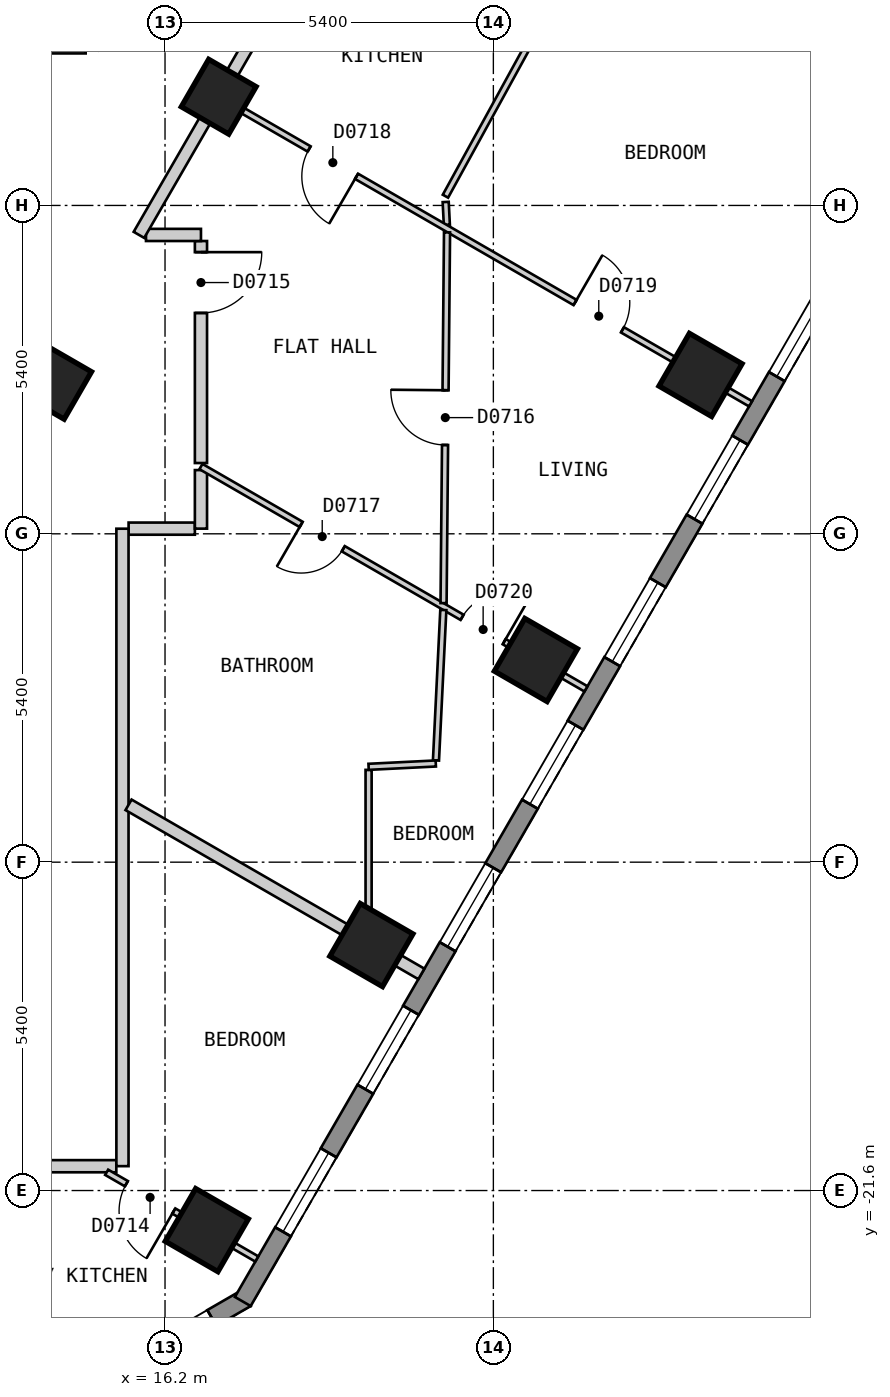
"""IFC4 building model, lengths in metres.
Left out: names, types, materials, properties, quantities, classifications, styles, units other than length and angle.
Written with IfcOpenShell. Run it as: python <this file> out.ifc"""

import sys

from ifc_helpers import new_model, si_unit, direction, frame, frame_2d, origin, origin_2d, place, context, subcontext, project, spatial, polyline, rectangle, outline, extrude, element, fill, save


model = new_model("IFC4")
c1 = context("Model", 3, precision=1e-05, world=origin(), true_north=direction((0.0, 1.0)))
c2 = subcontext(c1, "Body", "Model", "MODEL_VIEW")
j1 = project(units=[si_unit("LENGTHUNIT", "METRE"), si_unit("PLANEANGLEUNIT", "RADIAN")], contexts=[c1])
p1 = place(None, origin())
s1 = spatial("IfcSite", under=j1, at=p1, CompositionType="ELEMENT")
p2 = place(p1, origin())
s2 = spatial("IfcBuilding", under=s1, at=p2, CompositionType="ELEMENT")
p3 = place(p2, frame((0.0, 0.0, 105.0)))
s3 = spatial("IfcBuildingStorey", under=s2, at=p3, CompositionType="ELEMENT", Elevation=105.0)
for number, where, z_axis, x_axis in (
    (1, (16.887, -22.251, 0.0), (0.0, 0.0, 1.0), (0.5, 0.866, 0.0)),
    (2, (19.594, -17.563, 0.0), (0.0, 0.0, 1.0), (0.5, 0.866, 0.0)),
    (3, (22.3, -12.875, 0.0), (0.0, 0.0, 1.0), (0.5, 0.866, 0.0)),
    (4, (25.007, -8.187, 0.0), (0.0, 0.0, 1.0), (0.5, 0.866, 0.0)),
):
    element("IfcColumn", number, at=place(p3, frame(where, z_axis=z_axis, x_axis=x_axis)), inside=s3, PredefinedType="COLUMN", context=c2, shape_type="SweptSolid", body=[
        extrude(rectangle(XDim=1.0, YDim=1.0, at=origin_2d()), origin(), (0.0, 0.0, 1.0), 3.0),
    ])
for number, where, z_axis, x_axis in (
    (5, (14.376, -8.3, 0.0), (0.0, 0.0, 1.0), (0.5, 0.866, 0.0)),
    (6, (17.083, -3.612, 0.0), (0.0, 0.0, 1.0), (0.5, 0.866, 0.0)),
):
    element("IfcColumn", number, at=place(p3, frame(where, z_axis=z_axis, x_axis=x_axis)), inside=s3, PredefinedType="COLUMN", context=c2, shape_type="SweptSolid", body=[
        extrude(rectangle(XDim=0.9, YDim=0.9, at=origin_2d()), origin(), (0.0, 0.0, 1.0), 3.0),
    ])
p4 = place(p3, frame((13.204, -25.87, 0.0), z_axis=(0.0, 0.0, 1.0), x_axis=(0.866010750942, 0.50002537861, 0.0)))
e7 = element("IfcWall", 7, at=p4, inside=s3, PredefinedType="SOLIDWALL", context=c2, shape_type="SweptSolid", body=[
    extrude(outline(polyline([(0.0, -0.15), (5.0, -0.15), (4.919, 0.15), (0.08, 0.15), (0.0, -0.15)])), origin(), (0.0, 0.0, 1.0), 2.6),
])
p5 = place(p4, frame((0.65, 0.0, 0.15)))
e8 = element("IfcOpeningElement", 8, at=p5, cuts=e7, PredefinedType="OPENING", context=c2, shape_type="SweptSolid", body=[
    extrude(rectangle(XDim=1.2, YDim=2.1, at=frame_2d((0.6, 1.05))), frame((0.0, 0.16, 0.0), z_axis=(0.0, -1.0, 0.0), x_axis=(1.0, 0.0, 0.0)), (0.0, 0.0, 1.0), 0.32),
])
p6 = place(p4, frame((3.149, 0.0, 0.15)))
e9 = element("IfcOpeningElement", 9, at=p6, cuts=e7, PredefinedType="OPENING", context=c2, shape_type="SweptSolid", body=[
    extrude(rectangle(XDim=1.2, YDim=2.1, at=frame_2d((0.6, 1.05))), frame((0.0, 0.16, 0.0), z_axis=(0.0, -1.0, 0.0), x_axis=(1.0, 0.0, 0.0)), (0.0, 0.0, 1.0), 0.32),
])
p7 = place(p3, frame((17.479, -23.425, 0.0), z_axis=(0.0, 0.0, 1.0), x_axis=(0.500035407905, 0.866004960056, 0.0)))
e10 = element("IfcWall", 10, at=p7, inside=s3, PredefinedType="SOLIDWALL", context=c2, shape_type="SweptSolid", body=[
    extrude(outline(polyline([(0.0, -0.15), (23.094, -0.15), (23.014, 0.15), (0.08, 0.15), (0.0, -0.15)])), origin(), (0.0, 0.0, 1.0), 2.6),
])
p8 = place(p7, frame((1.324, 0.0, 0.15)))
e11 = element("IfcOpeningElement", 11, at=p8, cuts=e10, PredefinedType="OPENING", context=c2, shape_type="SweptSolid", body=[
    extrude(rectangle(XDim=1.5, YDim=2.1, at=frame_2d((0.75, 1.05))), frame((0.0, 0.16, 0.0), z_axis=(0.0, -1.0, 0.0), x_axis=(1.0, 0.0, 0.0)), (0.0, 0.0, 1.0), 0.32),
])
p9 = place(p7, frame((4.031, 0.0, 0.15)))
e12 = element("IfcOpeningElement", 12, at=p9, cuts=e10, PredefinedType="OPENING", context=c2, shape_type="SweptSolid", body=[
    extrude(rectangle(XDim=1.5, YDim=2.1, at=frame_2d((0.75, 1.05))), frame((0.0, 0.16, 0.0), z_axis=(0.0, -1.0, 0.0), x_axis=(1.0, 0.0, 0.0)), (0.0, 0.0, 1.0), 0.32),
])
p10 = place(p7, frame((6.737, 0.0, 0.15)))
e13 = element("IfcOpeningElement", 13, at=p10, cuts=e10, PredefinedType="OPENING", context=c2, shape_type="SweptSolid", body=[
    extrude(rectangle(XDim=1.5, YDim=2.1, at=frame_2d((0.75, 1.05))), frame((0.0, 0.16, 0.0), z_axis=(0.0, -1.0, 0.0), x_axis=(1.0, 0.0, 0.0)), (0.0, 0.0, 1.0), 0.32),
])
p11 = place(p7, frame((9.444, 0.0, 0.15)))
e14 = element("IfcOpeningElement", 14, at=p11, cuts=e10, PredefinedType="OPENING", context=c2, shape_type="SweptSolid", body=[
    extrude(rectangle(XDim=1.5, YDim=2.1, at=frame_2d((0.75, 1.05))), frame((0.0, 0.16, 0.0), z_axis=(0.0, -1.0, 0.0), x_axis=(1.0, 0.0, 0.0)), (0.0, 0.0, 1.0), 0.32),
])
p12 = place(p7, frame((12.151, 0.0, 0.15)))
e15 = element("IfcOpeningElement", 15, at=p12, cuts=e10, PredefinedType="OPENING", context=c2, shape_type="SweptSolid", body=[
    extrude(rectangle(XDim=1.5, YDim=2.1, at=frame_2d((0.75, 1.05))), frame((0.0, 0.16, 0.0), z_axis=(0.0, -1.0, 0.0), x_axis=(1.0, 0.0, 0.0)), (0.0, 0.0, 1.0), 0.32),
])
p13 = place(p7, frame((14.857, 0.0, 0.15)))
e16 = element("IfcOpeningElement", 16, at=p13, cuts=e10, PredefinedType="OPENING", context=c2, shape_type="SweptSolid", body=[
    extrude(rectangle(XDim=1.5, YDim=2.1, at=frame_2d((0.75, 1.05))), frame((0.0, 0.16, 0.0), z_axis=(0.0, -1.0, 0.0), x_axis=(1.0, 0.0, 0.0)), (0.0, 0.0, 1.0), 0.32),
])
p14 = place(p7, frame((17.564, 0.0, 0.15)))
e17 = element("IfcOpeningElement", 17, at=p14, cuts=e10, PredefinedType="OPENING", context=c2, shape_type="SweptSolid", body=[
    extrude(rectangle(XDim=1.5, YDim=2.1, at=frame_2d((0.75, 1.05))), frame((0.0, 0.16, 0.0), z_axis=(0.0, -1.0, 0.0), x_axis=(1.0, 0.0, 0.0)), (0.0, 0.0, 1.0), 0.32),
])
p15 = place(p7, frame((20.271, 0.0, 0.15)))
e18 = element("IfcOpeningElement", 18, at=p15, cuts=e10, PredefinedType="OPENING", context=c2, shape_type="SweptSolid", body=[
    extrude(rectangle(XDim=1.5, YDim=2.1, at=frame_2d((0.75, 1.05))), frame((0.0, 0.16, 0.0), z_axis=(0.0, -1.0, 0.0), x_axis=(1.0, 0.0, 0.0)), (0.0, 0.0, 1.0), 0.32),
])
p16 = place(p3, frame((16.791, -5.985, 0.0), z_axis=(0.0, 0.0, 1.0), x_axis=(0.0, -1.0, 0.0)))
e19 = element("IfcWall", 19, at=p16, inside=s3, PredefinedType="PARTITIONING", context=c2, shape_type="SweptSolid", body=[
    extrude(rectangle(XDim=3.651, YDim=0.2, at=frame_2d((1.825, 0.0))), origin(), (0.0, 0.0, 1.0), 2.6),
])
p17 = place(p16, frame((0.183, 0.0, 0.0)))
e20 = element("IfcOpeningElement", 20, at=p17, cuts=e19, PredefinedType="OPENING", context=c2, shape_type="SweptSolid", body=[
    extrude(rectangle(XDim=1.0, YDim=2.1, at=frame_2d((0.5, 1.05))), frame((0.0, 0.11, 0.0), z_axis=(0.0, -1.0, 0.0), x_axis=(1.0, 0.0, 0.0)), (0.0, 0.0, 1.0), 0.22),
])
p18 = place(p3, frame((15.887, -5.885, 0.0), z_axis=(0.0, 0.0, 1.0), x_axis=(1.0, 0.0, 0.0)))
e21 = element("IfcWall", 21, at=p18, inside=s3, PredefinedType="PARTITIONING", context=c2, shape_type="SweptSolid", body=[
    extrude(rectangle(XDim=0.904, YDim=0.2, at=frame_2d((0.452, 0.0))), origin(), (0.0, 0.0, 1.0), 2.6),
])
p19 = place(p3, frame((15.601, -10.715, 0.0), z_axis=(0.0, 0.0, 1.0), x_axis=(1.0, 0.0, 0.0)))
e22 = element("IfcWall", 22, at=p19, inside=s3, PredefinedType="PARTITIONING", context=c2, shape_type="SweptSolid", body=[
    extrude(rectangle(XDim=1.09, YDim=0.2, at=frame_2d((0.545, 0.0))), origin(), (0.0, 0.0, 1.0), 2.6),
])
p20 = place(p3, frame((-15.499, -21.2, 0.0), z_axis=(0.0, 0.0, 1.0), x_axis=(1.0, 0.0, 0.0)))
e23 = element("IfcWall", 23, at=p20, inside=s3, PredefinedType="PARTITIONING", context=c2, shape_type="SweptSolid", body=[
    extrude(rectangle(XDim=30.898, YDim=0.2, at=frame_2d((15.449, 0.0))), origin(), (0.0, 0.0, 1.0), 2.6),
])
p21 = place(p20, frame((9.977, 0.0, 0.0)))
e24 = element("IfcOpeningElement", 24, at=p21, cuts=e23, PredefinedType="OPENING", context=c2, shape_type="SweptSolid", body=[
    extrude(rectangle(XDim=1.0, YDim=2.1, at=frame_2d((0.5, 1.05))), frame((0.0, 0.11, 0.0), z_axis=(0.0, -1.0, 0.0), x_axis=(1.0, 0.0, 0.0)), (0.0, 0.0, 1.0), 0.22),
])
p22 = place(p20, frame((25.046, 0.0, 0.0)))
e25 = element("IfcOpeningElement", 25, at=p22, cuts=e23, PredefinedType="OPENING", context=c2, shape_type="SweptSolid", body=[
    extrude(rectangle(XDim=1.0, YDim=2.1, at=frame_2d((0.5, 1.05))), frame((0.0, 0.11, 0.0), z_axis=(0.0, -1.0, 0.0), x_axis=(1.0, 0.0, 0.0)), (0.0, 0.0, 1.0), 0.22),
])
p23 = place(p3, frame((6.929, -2.8, 0.0), z_axis=(0.0, 0.0, 1.0), x_axis=(1.0, 0.0, 0.0)))
e26 = element("IfcWall", 26, at=p23, inside=s3, PredefinedType="PARTITIONING", context=c2, shape_type="SweptSolid", body=[
    extrude(rectangle(XDim=7.966, YDim=0.2, at=frame_2d((3.983, 0.0))), origin(), (0.0, 0.0, 1.0), 2.6),
])
p24 = place(p3, frame((15.771, -5.884, 0.0), z_axis=(0.0, 0.0, 1.0), x_axis=(0.499917542299, 0.866073005526, 0.0)))
e27 = element("IfcWall", 27, at=p24, inside=s3, PredefinedType="PARTITIONING", context=c2, shape_type="SweptSolid", body=[
    extrude(rectangle(XDim=5.525, YDim=0.2, at=frame_2d((2.762, 0.0))), origin(), (0.0, 0.0, 1.0), 2.6),
])
p25 = place(p3, frame((15.5, -21.199, 0.0), z_axis=(0.0, 0.0, 1.0), x_axis=(0.0, 1.0, 0.0)))
e28 = element("IfcWall", 28, at=p25, inside=s3, PredefinedType="PARTITIONING", context=c2, shape_type="SweptSolid", body=[
    extrude(rectangle(XDim=10.483, YDim=0.2, at=frame_2d((5.241, 0.0))), origin(), (0.0, 0.0, 1.0), 2.6),
])
p26 = place(p3, frame((16.791, -10.715, 0.0), z_axis=(0.0, 0.0, 1.0), x_axis=(0.0, 1.0, 0.0)))
e29 = element("IfcWall", 29, at=p26, inside=s3, PredefinedType="PARTITIONING", context=c2, shape_type="SweptSolid", body=[
    extrude(rectangle(XDim=0.963, YDim=0.2, at=frame_2d((0.481, 0.0))), origin(), (0.0, 0.0, 1.0), 2.6),
])
p27 = place(p3, frame((20.816, -5.343, 0.0), z_axis=(0.0, 0.0, 1.0), x_axis=(0.05045379463, -0.99872639627, 0.0)))
e30 = element("IfcWall", 30, at=p27, inside=s3, PredefinedType="PARTITIONING", context=c2, shape_type="SweptSolid", body=[
    extrude(rectangle(XDim=0.377, YDim=0.1, at=frame_2d((0.189, 0.0))), origin(), (0.0, 0.0, 1.0), 2.6),
])
p28 = place(p3, frame((15.24, -21.3, 0.0), z_axis=(0.0, 0.0, 1.0), x_axis=(0.866090043625, -0.499888023795, 0.0)))
e31 = element("IfcWall", 31, at=p28, inside=s3, PredefinedType="PARTITIONING", context=c2, shape_type="SweptSolid", body=[
    extrude(rectangle(XDim=2.851, YDim=0.1, at=frame_2d((1.425, 0.0))), origin(), (0.0, 0.0, 1.0), 2.6),
])
p29 = place(p28, frame((0.375, 0.0, 0.0)))
e32 = element("IfcOpeningElement", 32, at=p29, cuts=e31, PredefinedType="OPENING", context=c2, shape_type="SweptSolid", body=[
    extrude(rectangle(XDim=0.9, YDim=2.1, at=frame_2d((0.45, 1.05))), frame((0.0, 0.06, 0.0), z_axis=(0.0, -1.0, 0.0), x_axis=(1.0, 0.0, 0.0)), (0.0, 0.0, 1.0), 0.12),
])
p30 = place(p3, frame((16.791, -9.694, 0.0), z_axis=(0.0, 0.0, 1.0), x_axis=(0.866013208994, -0.500021121402, 0.0)))
e33 = element("IfcWall", 33, at=p30, inside=s3, PredefinedType="PARTITIONING", context=c2, shape_type="SweptSolid", body=[
    extrude(rectangle(XDim=7.312, YDim=0.1, at=frame_2d((3.656, 0.0))), origin(), (0.0, 0.0, 1.0), 2.6),
])
p31 = place(p30, frame((1.903, 0.0, 0.0)))
e34 = element("IfcOpeningElement", 34, at=p31, cuts=e33, PredefinedType="OPENING", context=c2, shape_type="SweptSolid", body=[
    extrude(rectangle(XDim=0.8, YDim=2.1, at=frame_2d((0.4, 1.05))), frame((0.0, 0.06, 0.0), z_axis=(0.0, -1.0, 0.0), x_axis=(1.0, 0.0, 0.0)), (0.0, 0.0, 1.0), 0.12),
])
p32 = place(p30, frame((4.959, 0.0, 0.0)))
e35 = element("IfcOpeningElement", 35, at=p32, cuts=e33, PredefinedType="OPENING", context=c2, shape_type="SweptSolid", body=[
    extrude(rectangle(XDim=0.8, YDim=2.1, at=frame_2d((0.4, 1.05))), frame((0.0, 0.06, 0.0), z_axis=(0.0, -1.0, 0.0), x_axis=(1.0, 0.0, 0.0)), (0.0, 0.0, 1.0), 0.12),
])
p33 = place(p3, frame((17.169, -3.662, 0.0), z_axis=(0.0, 0.0, 1.0), x_axis=(0.866047370643, -0.499961950354, 0.0)))
e36 = element("IfcWall", 36, at=p33, inside=s3, PredefinedType="PARTITIONING", context=c2, shape_type="SweptSolid", body=[
    extrude(rectangle(XDim=10.001, YDim=0.1, at=frame_2d((5.0, 0.0))), origin(), (0.0, 0.0, 1.0), 2.6),
])
p34 = place(p33, frame((1.618, 0.0, 0.0)))
e37 = element("IfcOpeningElement", 37, at=p34, cuts=e36, PredefinedType="OPENING", context=c2, shape_type="SweptSolid", body=[
    extrude(rectangle(XDim=0.9, YDim=2.1, at=frame_2d((0.45, 1.05))), frame((0.0, 0.06, 0.0), z_axis=(0.0, -1.0, 0.0), x_axis=(1.0, 0.0, 0.0)), (0.0, 0.0, 1.0), 0.12),
])
p35 = place(p33, frame((6.668, 0.0, 0.0)))
e38 = element("IfcOpeningElement", 38, at=p35, cuts=e36, PredefinedType="OPENING", context=c2, shape_type="SweptSolid", body=[
    extrude(rectangle(XDim=0.9, YDim=2.1, at=frame_2d((0.45, 1.05))), frame((0.0, 0.06, 0.0), z_axis=(0.0, -1.0, 0.0), x_axis=(1.0, 0.0, 0.0)), (0.0, 0.0, 1.0), 0.12),
])
p36 = place(p3, frame((20.812, -5.248, 0.0), z_axis=(0.0, 0.0, 1.0), x_axis=(0.481296891345, 0.876557643502, 0.0)))
e39 = element("IfcWall", 39, at=p36, inside=s3, PredefinedType="PARTITIONING", context=c2, shape_type="SweptSolid", body=[
    extrude(rectangle(XDim=4.733, YDim=0.1, at=frame_2d((2.367, 0.0))), origin(), (0.0, 0.0, 1.0), 2.6),
])
p37 = place(p3, frame((20.656, -14.527, 0.0), z_axis=(0.0, 0.0, 1.0), x_axis=(0.048885629948, 0.998804382842, 0.0)))
e40 = element("IfcWall", 40, at=p37, inside=s3, PredefinedType="PARTITIONING", context=c2, shape_type="SweptSolid", body=[
    extrude(rectangle(XDim=2.477, YDim=0.1, at=frame_2d((1.239, 0.0))), origin(), (0.0, 0.0, 1.0), 2.6),
])
p38 = place(p3, frame((20.781, -11.94, 0.0), z_axis=(0.0, 0.0, 1.0), x_axis=(0.009329670416, 0.999956477678, 0.0)))
e41 = element("IfcWall", 41, at=p38, inside=s3, PredefinedType="PARTITIONING", context=c2, shape_type="SweptSolid", body=[
    extrude(rectangle(XDim=6.097, YDim=0.1, at=frame_2d((3.049, 0.0))), origin(), (0.0, 0.0, 1.0), 2.6),
])
p39 = place(p38, frame((2.601, 0.0, 0.0)))
e42 = element("IfcOpeningElement", 42, at=p39, cuts=e41, PredefinedType="OPENING", context=c2, shape_type="SweptSolid", body=[
    extrude(rectangle(XDim=0.9, YDim=2.1, at=frame_2d((0.45, 1.05))), frame((0.0, 0.06, 0.0), z_axis=(0.0, -1.0, 0.0), x_axis=(1.0, 0.0, 0.0)), (0.0, 0.0, 1.0), 0.12),
])
p40 = place(p3, frame((19.548, -17.421, 0.0), z_axis=(0.0, 0.0, 1.0), x_axis=(0.0, 1.0, 0.0)))
e43 = element("IfcWall", 43, at=p40, inside=s3, PredefinedType="PARTITIONING", context=c2, shape_type="SweptSolid", body=[
    extrude(rectangle(XDim=2.739, YDim=0.1, at=frame_2d((1.37, 0.0))), origin(), (0.0, 0.0, 1.0), 2.6),
])
p41 = place(p3, frame((19.548, -14.632, 0.0), z_axis=(0.0, 0.0, 1.0), x_axis=(0.998755638501, 0.049871580712, 0.0)))
e44 = element("IfcWall", 44, at=p41, inside=s3, PredefinedType="PARTITIONING", context=c2, shape_type="SweptSolid", body=[
    extrude(rectangle(XDim=1.106, YDim=0.1, at=frame_2d((0.553, 0.0))), origin(), (0.0, 0.0, 1.0), 2.6),
])
p42 = place(p3, frame((15.6, -15.257, 0.0), z_axis=(0.0, 0.0, 1.0), x_axis=(0.86598379672, -0.500072058625, 0.0)))
e45 = element("IfcWall", 45, at=p42, inside=s3, PredefinedType="PARTITIONING", context=c2, shape_type="SweptSolid", body=[
    extrude(rectangle(XDim=5.561, YDim=0.2, at=frame_2d((2.781, 0.0))), origin(), (0.0, 0.0, 1.0), 2.6),
])
p43 = place(p6, origin())
e46 = element("IfcWindow", 46, at=p43, inside=s3, PartitioningType="SINGLE_PANEL", PredefinedType="WINDOW", context=c2, shape_type="SweptSolid", body=[
    extrude(rectangle(XDim=1.2, YDim=2.1, at=frame_2d((0.6, 1.05))), frame((0.0, 0.03, 0.0), z_axis=(0.0, -1.0, 0.0), x_axis=(1.0, 0.0, 0.0)), (0.0, 0.0, 1.0), 0.06),
])
fill(e9, e46)
p44 = place(p8, origin())
e47 = element("IfcWindow", 47, at=p44, inside=s3, PartitioningType="SINGLE_PANEL", PredefinedType="WINDOW", context=c2, shape_type="SweptSolid", body=[
    extrude(rectangle(XDim=1.5, YDim=2.1, at=frame_2d((0.75, 1.05))), frame((0.0, 0.03, 0.0), z_axis=(0.0, -1.0, 0.0), x_axis=(1.0, 0.0, 0.0)), (0.0, 0.0, 1.0), 0.06),
])
fill(e11, e47)
p45 = place(p9, origin())
e48 = element("IfcWindow", 48, at=p45, inside=s3, PartitioningType="SINGLE_PANEL", PredefinedType="WINDOW", context=c2, shape_type="SweptSolid", body=[
    extrude(rectangle(XDim=1.5, YDim=2.1, at=frame_2d((0.75, 1.05))), frame((0.0, 0.03, 0.0), z_axis=(0.0, -1.0, 0.0), x_axis=(1.0, 0.0, 0.0)), (0.0, 0.0, 1.0), 0.06),
])
fill(e12, e48)
p46 = place(p10, origin())
e49 = element("IfcWindow", 49, at=p46, inside=s3, PartitioningType="SINGLE_PANEL", PredefinedType="WINDOW", context=c2, shape_type="SweptSolid", body=[
    extrude(rectangle(XDim=1.5, YDim=2.1, at=frame_2d((0.75, 1.05))), frame((0.0, 0.03, 0.0), z_axis=(0.0, -1.0, 0.0), x_axis=(1.0, 0.0, 0.0)), (0.0, 0.0, 1.0), 0.06),
])
fill(e13, e49)
p47 = place(p11, origin())
e50 = element("IfcWindow", 50, at=p47, inside=s3, PartitioningType="SINGLE_PANEL", PredefinedType="WINDOW", context=c2, shape_type="SweptSolid", body=[
    extrude(rectangle(XDim=1.5, YDim=2.1, at=frame_2d((0.75, 1.05))), frame((0.0, 0.03, 0.0), z_axis=(0.0, -1.0, 0.0), x_axis=(1.0, 0.0, 0.0)), (0.0, 0.0, 1.0), 0.06),
])
fill(e14, e50)
p48 = place(p12, origin())
e51 = element("IfcWindow", 51, at=p48, inside=s3, PartitioningType="SINGLE_PANEL", PredefinedType="WINDOW", context=c2, shape_type="SweptSolid", body=[
    extrude(rectangle(XDim=1.5, YDim=2.1, at=frame_2d((0.75, 1.05))), frame((0.0, 0.03, 0.0), z_axis=(0.0, -1.0, 0.0), x_axis=(1.0, 0.0, 0.0)), (0.0, 0.0, 1.0), 0.06),
])
fill(e15, e51)
p49 = place(p13, origin())
e52 = element("IfcWindow", 52, at=p49, inside=s3, PartitioningType="SINGLE_PANEL", PredefinedType="WINDOW", context=c2, shape_type="SweptSolid", body=[
    extrude(rectangle(XDim=1.5, YDim=2.1, at=frame_2d((0.75, 1.05))), frame((0.0, 0.03, 0.0), z_axis=(0.0, -1.0, 0.0), x_axis=(1.0, 0.0, 0.0)), (0.0, 0.0, 1.0), 0.06),
])
fill(e16, e52)
p50 = place(p14, origin())
e53 = element("IfcWindow", 53, at=p50, inside=s3, PartitioningType="SINGLE_PANEL", PredefinedType="WINDOW", context=c2, shape_type="SweptSolid", body=[
    extrude(rectangle(XDim=1.5, YDim=2.1, at=frame_2d((0.75, 1.05))), frame((0.0, 0.03, 0.0), z_axis=(0.0, -1.0, 0.0), x_axis=(1.0, 0.0, 0.0)), (0.0, 0.0, 1.0), 0.06),
])
fill(e17, e53)
p51 = place(p29, origin())
e54 = element("IfcDoor", 54, at=p51, inside=s3, OperationType="SINGLE_SWING_RIGHT", PredefinedType="DOOR", context=c2, shape_type="SweptSolid", body=[
    extrude(rectangle(XDim=0.9, YDim=2.1, at=frame_2d((0.45, 1.05))), frame((0.0, 0.025, 0.0), z_axis=(0.0, -1.0, 0.0), x_axis=(1.0, 0.0, 0.0)), (0.0, 0.0, 1.0), 0.05),
])
fill(e32, e54)
p52 = place(p17, origin())
e55 = element("IfcDoor", 55, at=p52, inside=s3, OperationType="SINGLE_SWING_LEFT", PredefinedType="DOOR", context=c2, shape_type="SweptSolid", body=[
    extrude(rectangle(XDim=1.0, YDim=2.1, at=frame_2d((0.5, 1.05))), frame((0.0, 0.025, 0.0), z_axis=(0.0, -1.0, 0.0), x_axis=(1.0, 0.0, 0.0)), (0.0, 0.0, 1.0), 0.05),
])
fill(e20, e55)
p53 = place(p39, origin())
e56 = element("IfcDoor", 56, at=p53, inside=s3, OperationType="SINGLE_SWING_RIGHT", PredefinedType="DOOR", context=c2, shape_type="SweptSolid", body=[
    extrude(rectangle(XDim=0.9, YDim=2.1, at=frame_2d((0.45, 1.05))), frame((0.0, 0.025, 0.0), z_axis=(0.0, -1.0, 0.0), x_axis=(1.0, 0.0, 0.0)), (0.0, 0.0, 1.0), 0.05),
])
fill(e42, e56)
p54 = place(p31, origin())
e57 = element("IfcDoor", 57, at=p54, inside=s3, OperationType="SINGLE_SWING_LEFT", PredefinedType="DOOR", context=c2, shape_type="SweptSolid", body=[
    extrude(rectangle(XDim=0.8, YDim=2.1, at=frame_2d((0.4, 1.05))), frame((0.0, 0.025, 0.0), z_axis=(0.0, -1.0, 0.0), x_axis=(1.0, 0.0, 0.0)), (0.0, 0.0, 1.0), 0.05),
])
fill(e34, e57)
p55 = place(p34, origin())
e58 = element("IfcDoor", 58, at=p55, inside=s3, OperationType="SINGLE_SWING_RIGHT", PredefinedType="DOOR", context=c2, shape_type="SweptSolid", body=[
    extrude(rectangle(XDim=0.9, YDim=2.1, at=frame_2d((0.45, 1.05))), frame((0.0, 0.025, 0.0), z_axis=(0.0, -1.0, 0.0), x_axis=(1.0, 0.0, 0.0)), (0.0, 0.0, 1.0), 0.05),
])
fill(e37, e58)
p56 = place(p35, origin())
e59 = element("IfcDoor", 59, at=p56, inside=s3, OperationType="SINGLE_SWING_LEFT", PredefinedType="DOOR", context=c2, shape_type="SweptSolid", body=[
    extrude(rectangle(XDim=0.9, YDim=2.1, at=frame_2d((0.45, 1.05))), frame((0.0, 0.025, 0.0), z_axis=(0.0, -1.0, 0.0), x_axis=(1.0, 0.0, 0.0)), (0.0, 0.0, 1.0), 0.05),
])
fill(e38, e59)
p57 = place(p32, origin())
e60 = element("IfcDoor", 60, at=p57, inside=s3, OperationType="SINGLE_SWING_RIGHT", PredefinedType="DOOR", context=c2, shape_type="SweptSolid", body=[
    extrude(rectangle(XDim=0.8, YDim=2.1, at=frame_2d((0.4, 1.05))), frame((0.0, 0.025, 0.0), z_axis=(0.0, -1.0, 0.0), x_axis=(1.0, 0.0, 0.0)), (0.0, 0.0, 1.0), 0.05),
])
fill(e35, e60)
save(model, sys.argv[1])
